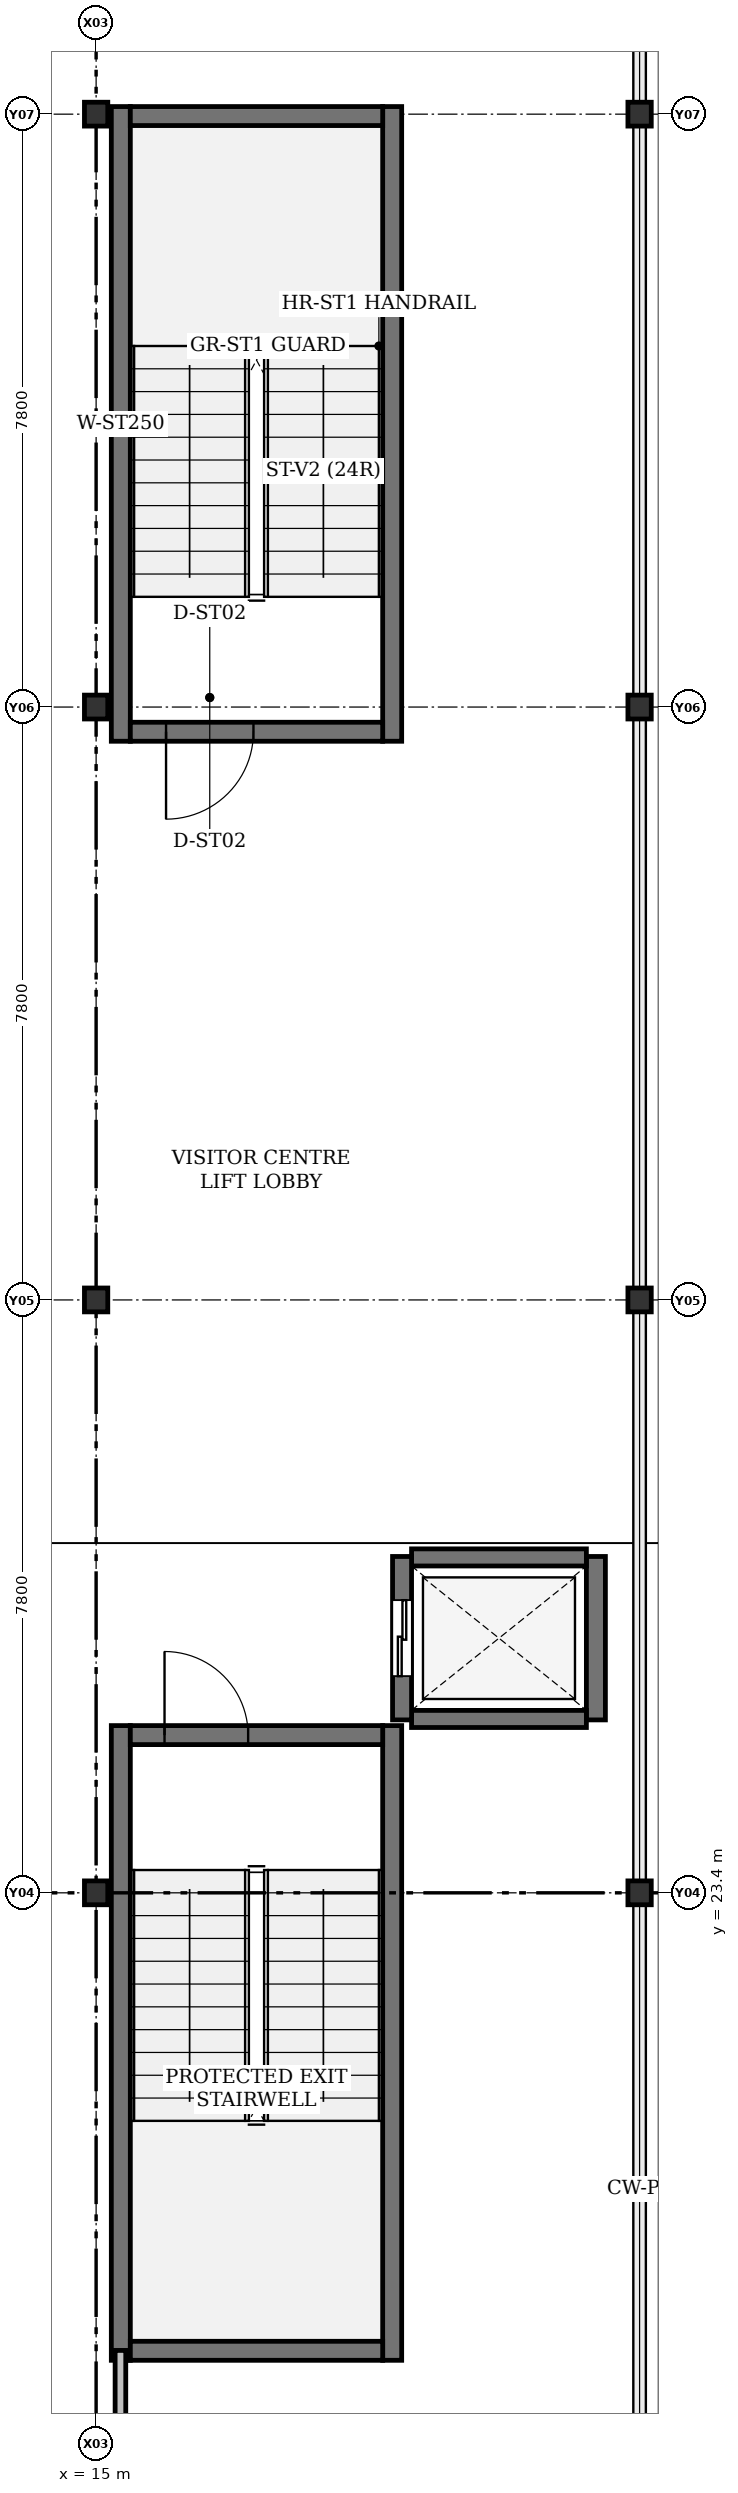
"""IFC4 building model, lengths in metres.
Left out: names, types, materials, properties, quantities, classifications, styles, units other than length and angle.
Written with IfcOpenShell. Run it as: python <this file> out.ifc"""

import sys

from ifc_helpers import new_model, si_unit, direction, frame, frame_2d, origin, origin_2d, place, context, subcontext, project, spatial, rectangle, i_section, extrude, element, fill, save


model = new_model("IFC4")
c1 = context("Model", 3, precision=1e-05, world=origin(), true_north=direction((0.0, 1.0)))
c2 = subcontext(c1, "Body", "Model", "MODEL_VIEW")
j1 = project(units=[si_unit("LENGTHUNIT", "METRE"), si_unit("PLANEANGLEUNIT", "RADIAN")], contexts=[c1])
p1 = place(None, origin())
s1 = spatial("IfcSite", under=j1, at=p1, CompositionType="ELEMENT")
p2 = place(p1, origin())
s2 = spatial("IfcBuilding", under=s1, at=p2, CompositionType="ELEMENT")
p3 = place(p2, frame((0.0, 0.0, 9.9)))
s3 = spatial("IfcBuildingStorey", under=s2, at=p3, CompositionType="ELEMENT", Elevation=9.9)
for number, where, z_axis, x_axis in (
    (1, (15.0, 23.4, 0.0), (0.0, 0.0, 1.0), (1.0, 0.0, 0.0)),
    (2, (15.0, 31.2, 0.0), (0.0, 0.0, 1.0), (1.0, 0.0, 0.0)),
    (3, (15.0, 39.0, 0.0), (0.0, 0.0, 1.0), (1.0, 0.0, 0.0)),
    (4, (15.0, 46.8, 0.0), (0.0, 0.0, 1.0), (1.0, 0.0, 0.0)),
    (5, (22.15, 23.4, 0.0), (0.0, 0.0, 1.0), (1.0, 0.0, 0.0)),
    (6, (22.15, 31.2, 0.0), (0.0, 0.0, 1.0), (1.0, 0.0, 0.0)),
    (7, (22.15, 39.0, 0.0), (0.0, 0.0, 1.0), (1.0, 0.0, 0.0)),
    (8, (22.15, 46.8, 0.0), (0.0, 0.0, 1.0), (1.0, 0.0, 0.0)),
):
    element("IfcColumn", number, at=place(p3, frame(where, z_axis=z_axis, x_axis=x_axis)), inside=s3, PredefinedType="COLUMN", context=c2, shape_type="SweptSolid", body=[
        extrude(i_section(OverallWidth=0.307, OverallDepth=0.314, WebThickness=0.012, FlangeThickness=0.019, FilletRadius=0.015, at=origin_2d()), origin(), (0.0, 0.0, 1.0), 4.2),
    ])
for number, where, z_axis, x_axis in (
    (9, (15.325, 17.25, 0.0), (0.0, 0.0, 1.0), (0.0, 1.0, 0.0)),
    (10, (18.895, 17.25, 0.0), (0.0, 0.0, 1.0), (0.0, 1.0, 0.0)),
):
    element("IfcWall", number, at=place(p3, frame(where, z_axis=z_axis, x_axis=x_axis)), inside=s3, PredefinedType="SHEAR", context=c2, shape_type="SweptSolid", body=[
        extrude(rectangle(XDim=8.35, YDim=0.25, at=frame_2d((4.175, 0.0))), origin(), (0.0, 0.0, 1.0), 4.2),
    ])
p4 = place(p3, frame((15.45, 17.375, 0.0), z_axis=(0.0, 0.0, 1.0), x_axis=(1.0, 0.0, 0.0)))
e11 = element("IfcWall", 11, at=p4, inside=s3, PredefinedType="SHEAR", context=c2, shape_type="SweptSolid", body=[
    extrude(rectangle(XDim=3.32, YDim=0.25, at=frame_2d((1.66, 0.0))), origin(), (0.0, 0.0, 1.0), 4.2),
])
p5 = place(p3, frame((15.45, 25.475, 0.0), z_axis=(0.0, 0.0, 1.0), x_axis=(1.0, 0.0, 0.0)))
e12 = element("IfcWall", 12, at=p5, inside=s3, PredefinedType="SHEAR", context=c2, shape_type="SweptSolid", body=[
    extrude(rectangle(XDim=3.32, YDim=0.25, at=frame_2d((1.66, 0.0))), origin(), (0.0, 0.0, 1.0), 4.2),
])
p6 = place(p5, frame((0.45, 0.0, 0.0)))
e13 = element("IfcOpeningElement", 13, at=p6, cuts=e12, PredefinedType="OPENING", context=c2, shape_type="SweptSolid", body=[
    extrude(rectangle(XDim=1.1, YDim=2.15, at=frame_2d((0.55, 1.075))), frame((0.0, 0.125, 0.0), z_axis=(0.0, -1.0, 0.0), x_axis=(1.0, 0.0, 0.0)), (0.0, 0.0, 1.0), 0.25),
])
for number, where, z_axis, x_axis in (
    (14, (15.325, 38.55, 0.0), (0.0, 0.0, 1.0), (0.0, 1.0, 0.0)),
    (15, (18.895, 38.55, 0.0), (0.0, 0.0, 1.0), (0.0, 1.0, 0.0)),
):
    element("IfcWall", number, at=place(p3, frame(where, z_axis=z_axis, x_axis=x_axis)), inside=s3, PredefinedType="SHEAR", context=c2, shape_type="SweptSolid", body=[
        extrude(rectangle(XDim=8.35, YDim=0.25, at=frame_2d((4.175, 0.0))), origin(), (0.0, 0.0, 1.0), 4.2),
    ])
p7 = place(p3, frame((15.45, 46.775, 0.0), z_axis=(0.0, 0.0, 1.0), x_axis=(1.0, 0.0, 0.0)))
e16 = element("IfcWall", 16, at=p7, inside=s3, PredefinedType="SHEAR", context=c2, shape_type="SweptSolid", body=[
    extrude(rectangle(XDim=3.32, YDim=0.25, at=frame_2d((1.66, 0.0))), origin(), (0.0, 0.0, 1.0), 4.2),
])
p8 = place(p3, frame((18.77, 38.675, 0.0), z_axis=(0.0, 0.0, 1.0), x_axis=(-1.0, 0.0, 0.0)))
e17 = element("IfcWall", 17, at=p8, inside=s3, PredefinedType="SHEAR", context=c2, shape_type="SweptSolid", body=[
    extrude(rectangle(XDim=3.32, YDim=0.25, at=frame_2d((1.66, 0.0))), origin(), (0.0, 0.0, 1.0), 4.2),
])
p9 = place(p8, frame((1.7, 0.0, 0.0)))
e18 = element("IfcOpeningElement", 18, at=p9, cuts=e17, PredefinedType="OPENING", context=c2, shape_type="SweptSolid", body=[
    extrude(rectangle(XDim=1.15, YDim=2.15, at=frame_2d((0.575, 1.075))), frame((0.0, 0.125, 0.0), z_axis=(0.0, -1.0, 0.0), x_axis=(1.0, 0.0, 0.0)), (0.0, 0.0, 1.0), 0.25),
])
p10 = place(p3, frame((21.575, 25.675, 0.0), z_axis=(0.0, 0.0, 1.0), x_axis=(0.0, 1.0, 0.0)))
e19 = element("IfcWall", 19, at=p10, inside=s3, PredefinedType="SHEAR", context=c2, shape_type="SweptSolid", body=[
    extrude(rectangle(XDim=2.15, YDim=0.25, at=frame_2d((1.075, 0.0))), origin(), (0.0, 0.0, 1.0), 4.2),
])
for number, where, z_axis, x_axis in (
    (20, (19.15, 25.688, 0.0), (0.0, 0.0, 1.0), (1.0, 0.0, 0.0)),
    (21, (19.15, 27.812, 0.0), (0.0, 0.0, 1.0), (1.0, 0.0, 0.0)),
):
    element("IfcWall", number, at=place(p3, frame(where, z_axis=z_axis, x_axis=x_axis)), inside=s3, PredefinedType="SHEAR", context=c2, shape_type="SweptSolid", body=[
        extrude(rectangle(XDim=2.3, YDim=0.225, at=frame_2d((1.15, 0.0))), origin(), (0.0, 0.0, 1.0), 4.2),
    ])
p11 = place(p3, frame((19.025, 25.675, 0.0), z_axis=(0.0, 0.0, 1.0), x_axis=(0.0, 1.0, 0.0)))
e22 = element("IfcWall", 22, at=p11, inside=s3, PredefinedType="SHEAR", context=c2, shape_type="SweptSolid", body=[
    extrude(rectangle(XDim=2.15, YDim=0.25, at=frame_2d((1.075, 0.0))), origin(), (0.0, 0.0, 1.0), 4.2),
])
p12 = place(p11, frame((0.575, 0.0, 0.0)))
e23 = element("IfcOpeningElement", 23, at=p12, cuts=e22, PredefinedType="OPENING", context=c2, shape_type="SweptSolid", body=[
    extrude(rectangle(XDim=1.0, YDim=2.1, at=frame_2d((0.5, 1.05))), frame((0.0, 0.125, 0.0), z_axis=(0.0, -1.0, 0.0), x_axis=(1.0, 0.0, 0.0)), (0.0, 0.0, 1.0), 0.25),
])
p13 = place(p3, frame((15.32, 15.6, 0.0), z_axis=(0.0, 0.0, 1.0), x_axis=(0.0, 1.0, 0.0)))
e24 = element("IfcWall", 24, at=p13, inside=s3, PredefinedType="PARTITIONING", context=c2, shape_type="SweptSolid", body=[
    extrude(rectangle(XDim=1.78, YDim=0.14, at=frame_2d((0.89, 0.0))), origin(), (0.0, 0.0, 1.0), 3.466),
])
p14 = place(p6, origin())
e25 = element("IfcDoor", 25, at=p14, inside=s3, OperationType="SINGLE_SWING_LEFT", PredefinedType="DOOR", context=c2, shape_type="SweptSolid", body=[
    extrude(rectangle(XDim=1.1, YDim=2.15, at=frame_2d((0.55, 1.075))), frame((0.0, 0.025, 0.0), z_axis=(0.0, -1.0, 0.0), x_axis=(1.0, 0.0, 0.0)), (0.0, 0.0, 1.0), 0.05),
])
fill(e13, e25)
p15 = place(p9, origin())
e26 = element("IfcDoor", 26, at=p15, inside=s3, OperationType="SINGLE_SWING_RIGHT", PredefinedType="DOOR", context=c2, shape_type="SweptSolid", body=[
    extrude(rectangle(XDim=1.15, YDim=2.15, at=frame_2d((0.575, 1.075))), frame((0.0, 0.025, 0.0), z_axis=(0.0, -1.0, 0.0), x_axis=(1.0, 0.0, 0.0)), (0.0, 0.0, 1.0), 0.05),
])
fill(e18, e26)
p16 = place(p12, origin())
e27 = element("IfcDoor", 27, at=p16, inside=s3, OperationType="SLIDING_TO_LEFT", PredefinedType="DOOR", context=c2, shape_type="SweptSolid", body=[
    extrude(rectangle(XDim=1.0, YDim=2.1, at=frame_2d((0.5, 1.05))), frame((0.0, 0.025, 0.0), z_axis=(0.0, -1.0, 0.0), x_axis=(1.0, 0.0, 0.0)), (0.0, 0.0, 1.0), 0.05),
])
fill(e23, e27)
save(model, sys.argv[1])
